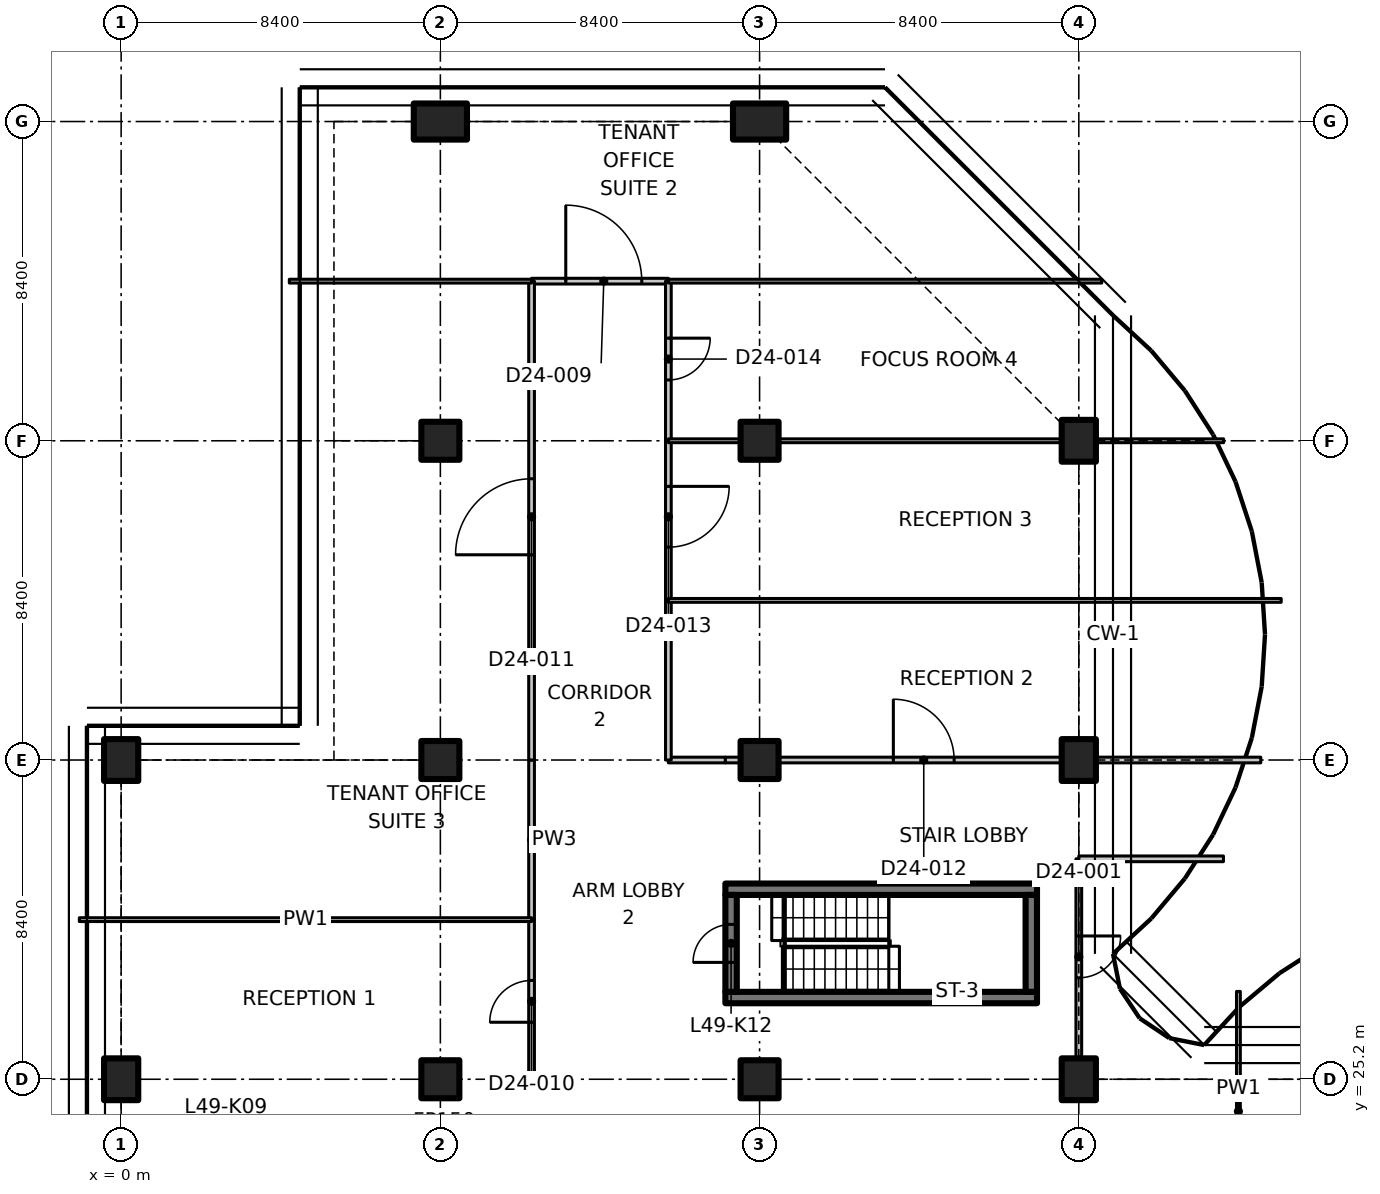
"""IFC4 building model, lengths in metres.
Left out: names, types, materials, properties, quantities, classifications, styles, units other than length and angle.
Written with IfcOpenShell. Run it as: python <this file> out.ifc"""

import sys

from ifc_helpers import new_model, si_unit, direction, frame, frame_2d, origin, origin_2d, place, context, subcontext, project, spatial, polyline, rectangle, outline, extrude, element, fill, save


model = new_model("IFC4")
c1 = context("Model", 3, precision=1e-05, world=origin(), true_north=direction((0.0, 1.0)))
c2 = subcontext(c1, "Body", "Model", "MODEL_VIEW")
j1 = project(units=[si_unit("LENGTHUNIT", "METRE"), si_unit("PLANEANGLEUNIT", "RADIAN")], contexts=[c1])
p1 = place(None, origin())
s1 = spatial("IfcSite", under=j1, at=p1, CompositionType="ELEMENT")
p2 = place(p1, origin())
s2 = spatial("IfcBuilding", under=s1, at=p2, CompositionType="ELEMENT")
p3 = place(p2, frame((0.0, 0.0, 195.6)))
s3 = spatial("IfcBuildingStorey", under=s2, at=p3, CompositionType="ELEMENT", Elevation=195.6)
for number, where, z_axis, x_axis in (
    (1, (0.0, 25.2, 0.0), (0.0, 0.0, 1.0), (1.0, 0.0, 0.0)),
    (2, (0.0, 33.6, 0.0), (0.0, 0.0, 1.0), (1.0, 0.0, 0.0)),
):
    element("IfcColumn", number, at=place(p3, frame(where, z_axis=z_axis, x_axis=x_axis)), inside=s3, PredefinedType="COLUMN", context=c2, shape_type="SweptSolid", body=[
        extrude(rectangle(XDim=0.9, YDim=1.1, at=origin_2d()), origin(), (0.0, 0.0, 1.0), 3.35),
    ])
for number, where, z_axis, x_axis in (
    (3, (8.4, 25.2, 0.0), (0.0, 0.0, 1.0), (1.0, 0.0, 0.0)),
    (4, (8.4, 33.6, 0.0), (0.0, 0.0, 1.0), (1.0, 0.0, 0.0)),
    (5, (8.4, 42.0, 0.0), (0.0, 0.0, 1.0), (1.0, 0.0, 0.0)),
):
    element("IfcColumn", number, at=place(p3, frame(where, z_axis=z_axis, x_axis=x_axis)), inside=s3, PredefinedType="COLUMN", context=c2, shape_type="SweptSolid", body=[
        extrude(rectangle(XDim=1.0, YDim=1.0, at=origin_2d()), origin(), (0.0, 0.0, 1.0), 3.35),
    ])
p4 = place(p3, frame((8.4, 50.4, 0.0), z_axis=(0.0, 0.0, 1.0), x_axis=(0.0, 1.0, 0.0)))
e6 = element("IfcColumn", 6, at=p4, inside=s3, PredefinedType="COLUMN", context=c2, shape_type="SweptSolid", body=[
    extrude(rectangle(XDim=0.95, YDim=1.4, at=origin_2d()), origin(), (0.0, 0.0, 1.0), 3.35),
])
for number, where, z_axis, x_axis in (
    (7, (16.8, 25.2, 0.0), (0.0, 0.0, 1.0), (1.0, 0.0, 0.0)),
    (8, (16.8, 33.6, 0.0), (0.0, 0.0, 1.0), (1.0, 0.0, 0.0)),
    (9, (16.8, 42.0, 0.0), (0.0, 0.0, 1.0), (1.0, 0.0, 0.0)),
):
    element("IfcColumn", number, at=place(p3, frame(where, z_axis=z_axis, x_axis=x_axis)), inside=s3, PredefinedType="COLUMN", context=c2, shape_type="SweptSolid", body=[
        extrude(rectangle(XDim=1.0, YDim=1.0, at=origin_2d()), origin(), (0.0, 0.0, 1.0), 3.35),
    ])
p5 = place(p3, frame((16.8, 50.4, 0.0), z_axis=(0.0, 0.0, 1.0), x_axis=(0.0, 1.0, 0.0)))
e10 = element("IfcColumn", 10, at=p5, inside=s3, PredefinedType="COLUMN", context=c2, shape_type="SweptSolid", body=[
    extrude(rectangle(XDim=0.95, YDim=1.4, at=origin_2d()), origin(), (0.0, 0.0, 1.0), 3.35),
])
for number, where, z_axis, x_axis in (
    (11, (25.2, 25.2, 0.0), (0.0, 0.0, 1.0), (1.0, 0.0, 0.0)),
    (12, (25.2, 33.6, 0.0), (0.0, 0.0, 1.0), (1.0, 0.0, 0.0)),
    (13, (25.2, 42.0, 0.0), (0.0, 0.0, 1.0), (1.0, 0.0, 0.0)),
):
    element("IfcColumn", number, at=place(p3, frame(where, z_axis=z_axis, x_axis=x_axis)), inside=s3, PredefinedType="COLUMN", context=c2, shape_type="SweptSolid", body=[
        extrude(rectangle(XDim=0.9, YDim=1.1, at=origin_2d()), origin(), (0.0, 0.0, 1.0), 3.35),
    ])
for number, where, z_axis, x_axis in (
    (14, (15.9, 27.35, 0.0), (0.0, 0.0, 1.0), (1.0, 0.0, 0.0)),
    (15, (15.9, 30.2, 0.0), (0.0, 0.0, 1.0), (1.0, 0.0, 0.0)),
):
    element("IfcWall", number, at=place(p3, frame(where, z_axis=z_axis, x_axis=x_axis)), inside=s3, PredefinedType="SHEAR", context=c2, shape_type="SweptSolid", body=[
        extrude(rectangle(XDim=8.2, YDim=0.3, at=frame_2d((4.1, 0.0))), origin(), (0.0, 0.0, 1.0), 3.35),
    ])
p6 = place(p3, frame((16.05, 27.5, 0.0), z_axis=(0.0, 0.0, 1.0), x_axis=(0.0, 1.0, 0.0)))
e16 = element("IfcWall", 16, at=p6, inside=s3, PredefinedType="SHEAR", context=c2, shape_type="SweptSolid", body=[
    extrude(rectangle(XDim=2.55, YDim=0.3, at=frame_2d((1.275, 0.0))), origin(), (0.0, 0.0, 1.0), 3.35),
])
p7 = place(p6, frame((0.775, 0.0, 0.0)))
e17 = element("IfcOpeningElement", 17, at=p7, cuts=e16, PredefinedType="OPENING", context=c2, shape_type="SweptSolid", body=[
    extrude(rectangle(XDim=1.0, YDim=2.1, at=frame_2d((0.5, 1.05))), frame((0.0, 0.16, 0.0), z_axis=(0.0, -1.0, 0.0), x_axis=(1.0, 0.0, 0.0)), (0.0, 0.0, 1.0), 0.32),
])
p8 = place(p3, frame((23.95, 27.5, 0.0), z_axis=(0.0, 0.0, 1.0), x_axis=(0.0, 1.0, 0.0)))
e18 = element("IfcWall", 18, at=p8, inside=s3, PredefinedType="SHEAR", context=c2, shape_type="SweptSolid", body=[
    extrude(rectangle(XDim=2.55, YDim=0.3, at=frame_2d((1.275, 0.0))), origin(), (0.0, 0.0, 1.0), 3.35),
])
p9 = place(p3, frame((29.4, 27.511, 0.0), z_axis=(0.0, 0.0, 1.0), x_axis=(0.0, -1.0, 0.0)))
e19 = element("IfcWall", 19, at=p9, inside=s3, PredefinedType="PARTITIONING", context=c2, shape_type="SweptSolid", body=[
    extrude(outline(polyline([(0.0, 0.0), (6.311, 0.0), (6.311, 3.33), (2.761, 3.33), (2.759, 2.98), (1.863, 2.98), (1.861, 3.33), (0.236, 3.33), (0.0, 3.33), (0.0, 0.0)])), frame((0.0, 0.05, 0.0), z_axis=(0.0, -1.0, 0.0), x_axis=(1.0, 0.0, 0.0)), (0.0, 0.0, 1.0), 0.1),
])
p10 = place(p3, frame((25.2, 31.0, 0.0), z_axis=(0.0, 0.0, 1.0), x_axis=(0.0, -1.0, 0.0)))
e20 = element("IfcWall", 20, at=p10, inside=s3, PredefinedType="PARTITIONING", context=c2, shape_type="SweptSolid", body=[
    extrude(outline(polyline([(0.0, 0.0), (5.23, 0.0), (5.23, 2.98), (0.0, 2.98), (0.0, 0.0)])), frame((0.0, 0.075, 0.0), z_axis=(0.0, -1.0, 0.0), x_axis=(1.0, 0.0, 0.0)), (0.0, 0.0, 1.0), 0.15),
])
p11 = place(p10, frame((2.03, 0.0, 0.0)))
e21 = element("IfcOpeningElement", 21, at=p11, cuts=e20, PredefinedType="OPENING", context=c2, shape_type="SweptSolid", body=[
    extrude(rectangle(XDim=1.1, YDim=2.1, at=frame_2d((0.55, 1.05))), frame((0.0, 0.085, 0.0), z_axis=(0.0, -1.0, 0.0), x_axis=(1.0, 0.0, 0.0)), (0.0, 0.0, 1.0), 0.17),
])
p12 = place(p3, frame((25.2, 31.0, 0.0), z_axis=(0.0, 0.0, 1.0), x_axis=(1.0, 0.0, 0.0)))
e22 = element("IfcWall", 22, at=p12, inside=s3, PredefinedType="PARTITIONING", context=c2, shape_type="SweptSolid", body=[
    extrude(rectangle(XDim=3.806, YDim=0.15, at=frame_2d((1.903, 0.0))), origin(), (0.0, 0.0, 1.0), 2.98),
])
p13 = place(p3, frame((10.8, 25.2, 0.0), z_axis=(0.0, 0.0, 1.0), x_axis=(0.0, 1.0, 0.0)))
e23 = element("IfcWall", 23, at=p13, inside=s3, PredefinedType="PARTITIONING", context=c2, shape_type="SweptSolid", body=[
    extrude(rectangle(XDim=4.2, YDim=0.15, at=frame_2d((2.1, 0.0))), origin(), (0.0, 0.0, 1.0), 3.33),
])
p14 = place(p13, frame((1.5, 0.0, 0.0)))
e24 = element("IfcOpeningElement", 24, at=p14, cuts=e23, PredefinedType="OPENING", context=c2, shape_type="SweptSolid", body=[
    extrude(rectangle(XDim=1.1, YDim=2.1, at=frame_2d((0.55, 1.05))), frame((0.0, 0.085, 0.0), z_axis=(0.0, -1.0, 0.0), x_axis=(1.0, 0.0, 0.0)), (0.0, 0.0, 1.0), 0.17),
])
p15 = place(p3, frame((10.8, 29.4, 0.0), z_axis=(0.0, 0.0, 1.0), x_axis=(0.0, 1.0, 0.0)))
e25 = element("IfcWall", 25, at=p15, inside=s3, PredefinedType="PARTITIONING", context=c2, shape_type="SweptSolid", body=[
    extrude(rectangle(XDim=4.2, YDim=0.15, at=frame_2d((2.1, 0.0))), origin(), (0.0, 0.0, 1.0), 3.33),
])
p16 = place(p3, frame((14.4, 33.6, 0.0), z_axis=(0.0, 0.0, 1.0), x_axis=(1.0, 0.0, 0.0)))
e26 = element("IfcWall", 26, at=p16, inside=s3, PredefinedType="PARTITIONING", context=c2, shape_type="SweptSolid", body=[
    extrude(rectangle(XDim=1.5, YDim=0.15, at=frame_2d((0.75, 0.0))), origin(), (0.0, 0.0, 1.0), 3.33),
])
p17 = place(p3, frame((15.9, 33.6, 0.0), z_axis=(0.0, 0.0, 1.0), x_axis=(1.0, 0.0, 0.0)))
e27 = element("IfcWall", 27, at=p17, inside=s3, PredefinedType="PARTITIONING", context=c2, shape_type="SweptSolid", body=[
    extrude(rectangle(XDim=0.38, YDim=0.15, at=frame_2d((0.19, 0.0))), origin(), (0.0, 0.0, 1.0), 3.33),
])
p18 = place(p3, frame((17.32, 33.6, 0.0), z_axis=(0.0, 0.0, 1.0), x_axis=(1.0, 0.0, 0.0)))
e28 = element("IfcWall", 28, at=p18, inside=s3, PredefinedType="PARTITIONING", context=c2, shape_type="SweptSolid", body=[
    extrude(rectangle(XDim=7.41, YDim=0.15, at=frame_2d((3.705, 0.0))), origin(), (0.0, 0.0, 1.0), 3.33),
])
p19 = place(p18, frame((3.0, 0.0, 0.0)))
e29 = element("IfcOpeningElement", 29, at=p19, cuts=e28, PredefinedType="OPENING", context=c2, shape_type="SweptSolid", body=[
    extrude(rectangle(XDim=1.6, YDim=2.1, at=frame_2d((0.8, 1.05))), frame((0.0, 0.085, 0.0), z_axis=(0.0, -1.0, 0.0), x_axis=(1.0, 0.0, 0.0)), (0.0, 0.0, 1.0), 0.17),
])
p20 = place(p3, frame((25.67, 33.6, 0.0), z_axis=(0.0, 0.0, 1.0), x_axis=(1.0, 0.0, 0.0)))
e30 = element("IfcWall", 30, at=p20, inside=s3, PredefinedType="PARTITIONING", context=c2, shape_type="SweptSolid", body=[
    extrude(rectangle(XDim=4.318, YDim=0.15, at=frame_2d((2.159, 0.0))), origin(), (0.0, 0.0, 1.0), 2.98),
])
p21 = place(p3, frame((10.8, 46.2, 0.0), z_axis=(0.0, 0.0, 1.0), x_axis=(1.0, 0.0, 0.0)))
e31 = element("IfcWall", 31, at=p21, inside=s3, PredefinedType="PARTITIONING", context=c2, shape_type="SweptSolid", body=[
    extrude(rectangle(XDim=3.6, YDim=0.15, at=frame_2d((1.8, 0.0))), origin(), (0.0, 0.0, 1.0), 3.33),
])
p22 = place(p21, frame((0.9, 0.0, 0.0)))
e32 = element("IfcOpeningElement", 32, at=p22, cuts=e31, PredefinedType="OPENING", context=c2, shape_type="SweptSolid", body=[
    extrude(rectangle(XDim=2.0, YDim=2.4, at=frame_2d((1.0, 1.2))), frame((0.0, 0.085, 0.0), z_axis=(0.0, -1.0, 0.0), x_axis=(1.0, 0.0, 0.0)), (0.0, 0.0, 1.0), 0.17),
])
p23 = place(p3, frame((10.8, 33.6, 0.0), z_axis=(0.0, 0.0, 1.0), x_axis=(0.0, 1.0, 0.0)))
e33 = element("IfcWall", 33, at=p23, inside=s3, PredefinedType="PARTITIONING", context=c2, shape_type="SweptSolid", body=[
    extrude(rectangle(XDim=12.6, YDim=0.15, at=frame_2d((6.3, 0.0))), origin(), (0.0, 0.0, 1.0), 3.33),
])
p24 = place(p23, frame((5.4, 0.0, 0.0)))
e34 = element("IfcOpeningElement", 34, at=p24, cuts=e33, PredefinedType="OPENING", context=c2, shape_type="SweptSolid", body=[
    extrude(rectangle(XDim=2.0, YDim=2.4, at=frame_2d((1.0, 1.2))), frame((0.0, 0.085, 0.0), z_axis=(0.0, -1.0, 0.0), x_axis=(1.0, 0.0, 0.0)), (0.0, 0.0, 1.0), 0.17),
])
p25 = place(p3, frame((14.4, 37.8, 0.0), z_axis=(0.0, 0.0, 1.0), x_axis=(0.0, -1.0, 0.0)))
e35 = element("IfcWall", 35, at=p25, inside=s3, PredefinedType="PARTITIONING", context=c2, shape_type="SweptSolid", body=[
    extrude(rectangle(XDim=4.2, YDim=0.15, at=frame_2d((2.1, 0.0))), origin(), (0.0, 0.0, 1.0), 3.33),
])
p26 = place(p3, frame((14.4, 42.0, 0.0), z_axis=(0.0, 0.0, 1.0), x_axis=(0.0, -1.0, 0.0)))
e36 = element("IfcWall", 36, at=p26, inside=s3, PredefinedType="PARTITIONING", context=c2, shape_type="SweptSolid", body=[
    extrude(rectangle(XDim=4.2, YDim=0.15, at=frame_2d((2.1, 0.0))), origin(), (0.0, 0.0, 1.0), 3.33),
])
p27 = place(p26, frame((1.2, 0.0, 0.0)))
e37 = element("IfcOpeningElement", 37, at=p27, cuts=e36, PredefinedType="OPENING", context=c2, shape_type="SweptSolid", body=[
    extrude(rectangle(XDim=1.6, YDim=2.1, at=frame_2d((0.8, 1.05))), frame((0.0, 0.085, 0.0), z_axis=(0.0, -1.0, 0.0), x_axis=(1.0, 0.0, 0.0)), (0.0, 0.0, 1.0), 0.17),
])
p28 = place(p3, frame((14.4, 46.2, 0.0), z_axis=(0.0, 0.0, 1.0), x_axis=(0.0, -1.0, 0.0)))
e38 = element("IfcWall", 38, at=p28, inside=s3, PredefinedType="PARTITIONING", context=c2, shape_type="SweptSolid", body=[
    extrude(rectangle(XDim=4.2, YDim=0.15, at=frame_2d((2.1, 0.0))), origin(), (0.0, 0.0, 1.0), 3.33),
])
p29 = place(p28, frame((1.5, 0.0, 0.0)))
e39 = element("IfcOpeningElement", 39, at=p29, cuts=e38, PredefinedType="OPENING", context=c2, shape_type="SweptSolid", body=[
    extrude(rectangle(XDim=1.1, YDim=2.1, at=frame_2d((0.55, 1.05))), frame((0.0, 0.085, 0.0), z_axis=(0.0, -1.0, 0.0), x_axis=(1.0, 0.0, 0.0)), (0.0, 0.0, 1.0), 0.17),
])
p30 = place(p3, frame((10.8, 46.2, 0.0), z_axis=(0.0, 0.0, 1.0), x_axis=(-1.0, 0.0, 0.0)))
e40 = element("IfcWall", 40, at=p30, inside=s3, PredefinedType="PARTITIONING", context=c2, shape_type="SweptSolid", body=[
    extrude(outline(polyline([(0.0, 0.0), (6.374, 0.0), (6.374, 3.33), (6.3, 3.33), (5.65, 3.33), (5.648, 2.98), (4.752, 2.98), (4.75, 3.33), (0.0, 3.33), (0.0, 0.0)])), frame((0.0, 0.05, 0.0), z_axis=(0.0, -1.0, 0.0), x_axis=(1.0, 0.0, 0.0)), (0.0, 0.0, 1.0), 0.1),
])
p31 = place(p3, frame((25.805, 46.2, 0.0), z_axis=(0.0, 0.0, 1.0), x_axis=(-1.0, 0.0, 0.0)))
e41 = element("IfcWall", 41, at=p31, inside=s3, PredefinedType="PARTITIONING", context=c2, shape_type="SweptSolid", body=[
    extrude(outline(polyline([(0.0, 0.0), (11.406, 0.0), (11.406, 3.33), (5.471, 3.33), (5.469, 2.98), (4.142, 2.98), (4.14, 3.33), (0.406, 3.33), (0.0, 3.33), (0.0, 0.0)])), frame((0.0, 0.05, 0.0), z_axis=(0.0, -1.0, 0.0), x_axis=(1.0, 0.0, 0.0)), (0.0, 0.0, 1.0), 0.1),
])
p32 = place(p3, frame((-1.1, 29.4, 0.0), z_axis=(0.0, 0.0, 1.0), x_axis=(1.0, 0.0, 0.0)))
e42 = element("IfcWall", 42, at=p32, inside=s3, PredefinedType="PARTITIONING", context=c2, shape_type="SweptSolid", body=[
    extrude(outline(polyline([(0.0, 0.0), (11.9, 0.0), (11.9, 3.33), (1.55, 3.33), (1.548, 2.98), (0.652, 2.98), (0.65, 3.33), (0.0, 3.33), (0.0, 0.0)])), frame((0.0, 0.05, 0.0), z_axis=(0.0, -1.0, 0.0), x_axis=(1.0, 0.0, 0.0)), (0.0, 0.0, 1.0), 0.1),
])
p33 = place(p3, frame((14.4, 37.8, 0.0), z_axis=(0.0, 0.0, 1.0), x_axis=(1.0, 0.0, 0.0)))
e43 = element("IfcWall", 43, at=p33, inside=s3, PredefinedType="PARTITIONING", context=c2, shape_type="SweptSolid", body=[
    extrude(outline(polyline([(0.0, 0.0), (16.126, 0.0), (16.126, 3.33), (15.843, 3.33), (11.25, 3.33), (11.248, 2.98), (10.352, 2.98), (10.35, 3.33), (0.0, 3.33), (0.0, 0.0)])), frame((0.0, 0.05, 0.0), z_axis=(0.0, -1.0, 0.0), x_axis=(1.0, 0.0, 0.0)), (0.0, 0.0, 1.0), 0.1),
])
p34 = place(p3, frame((14.4, 42.0, 0.0), z_axis=(0.0, 0.0, 1.0), x_axis=(1.0, 0.0, 0.0)))
e44 = element("IfcWall", 44, at=p34, inside=s3, PredefinedType="PARTITIONING", context=c2, shape_type="SweptSolid", body=[
    extrude(rectangle(XDim=1.88, YDim=0.1, at=frame_2d((0.94, 0.0))), origin(), (0.0, 0.0, 1.0), 3.33),
])
p35 = place(p3, frame((17.32, 42.0, 0.0), z_axis=(0.0, 0.0, 1.0), x_axis=(1.0, 0.0, 0.0)))
e45 = element("IfcWall", 45, at=p35, inside=s3, PredefinedType="PARTITIONING", context=c2, shape_type="SweptSolid", body=[
    extrude(outline(polyline([(0.0, 0.0), (7.41, 0.0), (7.41, 2.98), (7.216, 2.98), (7.214, 3.33), (0.0, 3.33), (0.0, 0.0)])), frame((0.0, 0.05, 0.0), z_axis=(0.0, -1.0, 0.0), x_axis=(1.0, 0.0, 0.0)), (0.0, 0.0, 1.0), 0.1),
])
p36 = place(p3, frame((25.67, 42.0, 0.0), z_axis=(0.0, 0.0, 1.0), x_axis=(1.0, 0.0, 0.0)))
e46 = element("IfcWall", 46, at=p36, inside=s3, PredefinedType="PARTITIONING", context=c2, shape_type="SweptSolid", body=[
    extrude(rectangle(XDim=3.342, YDim=0.1, at=frame_2d((1.671, 0.0))), origin(), (0.0, 0.0, 1.0), 2.98),
])
p37 = place(p7, origin())
e47 = element("IfcDoor", 47, at=p37, inside=s3, OperationType="SINGLE_SWING_RIGHT", PredefinedType="DOOR", context=c2, shape_type="SweptSolid", body=[
    extrude(rectangle(XDim=1.0, YDim=2.1, at=frame_2d((0.5, 1.05))), frame((0.0, 0.025, 0.0), z_axis=(0.0, -1.0, 0.0), x_axis=(1.0, 0.0, 0.0)), (0.0, 0.0, 1.0), 0.05),
])
fill(e17, e47)
p38 = place(p11, origin())
e48 = element("IfcDoor", 48, at=p38, inside=s3, OperationType="SINGLE_SWING_RIGHT", PredefinedType="DOOR", context=c2, shape_type="SweptSolid", body=[
    extrude(rectangle(XDim=1.1, YDim=2.1, at=frame_2d((0.55, 1.05))), frame((0.0, 0.025, 0.0), z_axis=(0.0, -1.0, 0.0), x_axis=(1.0, 0.0, 0.0)), (0.0, 0.0, 1.0), 0.05),
])
fill(e21, e48)
p39 = place(p22, origin())
e49 = element("IfcDoor", 49, at=p39, inside=s3, OperationType="DOUBLE_DOOR_SINGLE_SWING", PredefinedType="DOOR", context=c2, shape_type="SweptSolid", body=[
    extrude(rectangle(XDim=2.0, YDim=2.4, at=frame_2d((1.0, 1.2))), frame((0.0, 0.025, 0.0), z_axis=(0.0, -1.0, 0.0), x_axis=(1.0, 0.0, 0.0)), (0.0, 0.0, 1.0), 0.05),
])
fill(e32, e49)
p40 = place(p14, origin())
e50 = element("IfcDoor", 50, at=p40, inside=s3, OperationType="SINGLE_SWING_LEFT", PredefinedType="DOOR", context=c2, shape_type="SweptSolid", body=[
    extrude(rectangle(XDim=1.1, YDim=2.1, at=frame_2d((0.55, 1.05))), frame((0.0, 0.025, 0.0), z_axis=(0.0, -1.0, 0.0), x_axis=(1.0, 0.0, 0.0)), (0.0, 0.0, 1.0), 0.05),
])
fill(e24, e50)
p41 = place(p24, origin())
e51 = element("IfcDoor", 51, at=p41, inside=s3, OperationType="DOUBLE_DOOR_SINGLE_SWING", PredefinedType="DOOR", context=c2, shape_type="SweptSolid", body=[
    extrude(rectangle(XDim=2.0, YDim=2.4, at=frame_2d((1.0, 1.2))), frame((0.0, 0.025, 0.0), z_axis=(0.0, -1.0, 0.0), x_axis=(1.0, 0.0, 0.0)), (0.0, 0.0, 1.0), 0.05),
])
fill(e34, e51)
p42 = place(p19, origin())
e52 = element("IfcDoor", 52, at=p42, inside=s3, OperationType="DOUBLE_DOOR_SINGLE_SWING", PredefinedType="DOOR", context=c2, shape_type="SweptSolid", body=[
    extrude(rectangle(XDim=1.6, YDim=2.1, at=frame_2d((0.8, 1.05))), frame((0.0, 0.025, 0.0), z_axis=(0.0, -1.0, 0.0), x_axis=(1.0, 0.0, 0.0)), (0.0, 0.0, 1.0), 0.05),
])
fill(e29, e52)
p43 = place(p27, origin())
e53 = element("IfcDoor", 53, at=p43, inside=s3, OperationType="DOUBLE_DOOR_SINGLE_SWING", PredefinedType="DOOR", context=c2, shape_type="SweptSolid", body=[
    extrude(rectangle(XDim=1.6, YDim=2.1, at=frame_2d((0.8, 1.05))), frame((0.0, 0.025, 0.0), z_axis=(0.0, -1.0, 0.0), x_axis=(1.0, 0.0, 0.0)), (0.0, 0.0, 1.0), 0.05),
])
fill(e37, e53)
p44 = place(p29, origin())
e54 = element("IfcDoor", 54, at=p44, inside=s3, OperationType="SINGLE_SWING_LEFT", PredefinedType="DOOR", context=c2, shape_type="SweptSolid", body=[
    extrude(rectangle(XDim=1.1, YDim=2.1, at=frame_2d((0.55, 1.05))), frame((0.0, 0.025, 0.0), z_axis=(0.0, -1.0, 0.0), x_axis=(1.0, 0.0, 0.0)), (0.0, 0.0, 1.0), 0.05),
])
fill(e39, e54)
save(model, sys.argv[1])
